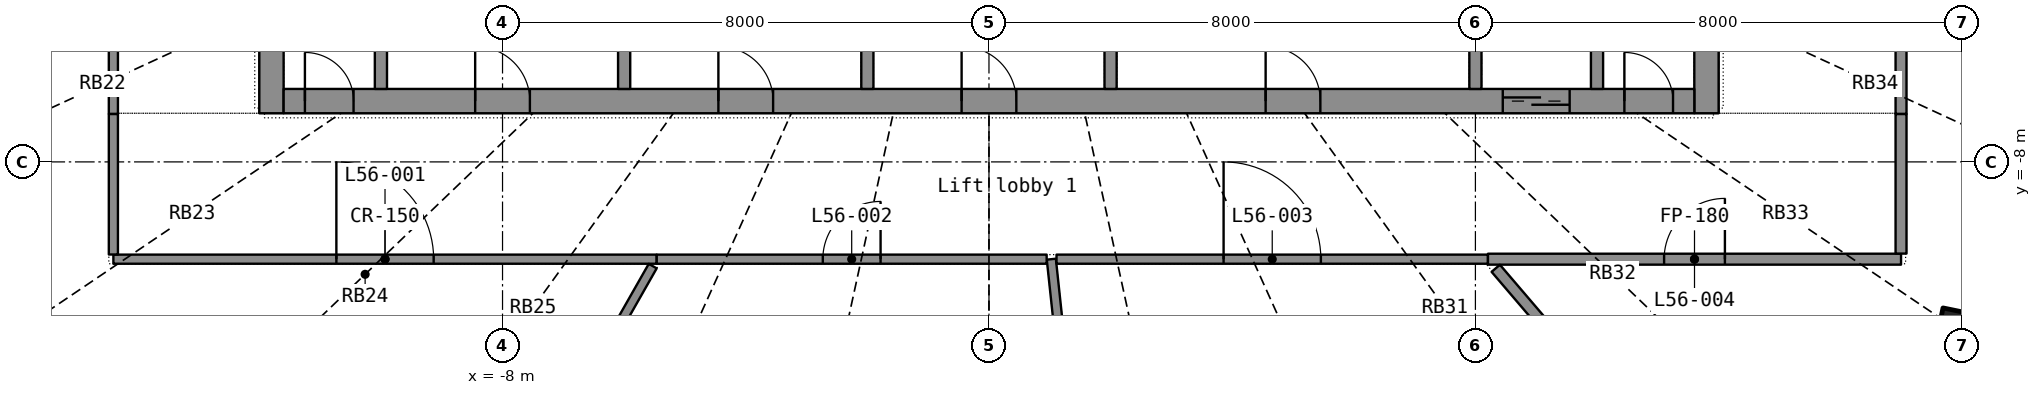
"""IFC4 building model, lengths in metres.
Left out: names, types, materials, properties, quantities, classifications, styles, units other than length and angle.
Written with IfcOpenShell. Run it as: python <this file> out.ifc"""

import sys

from ifc_helpers import new_model, si_unit, direction, frame, frame_2d, origin, origin_2d, place, context, subcontext, project, spatial, rectangle, hollow_rectangle, extrude, element, fill, save


model = new_model("IFC4")
c1 = context("Model", 3, precision=1e-05, world=origin(), true_north=direction((0.0, 1.0)))
c2 = subcontext(c1, "Body", "Model", "MODEL_VIEW")
j1 = project(units=[si_unit("LENGTHUNIT", "METRE"), si_unit("PLANEANGLEUNIT", "RADIAN")], contexts=[c1])
p1 = place(None, origin())
s1 = spatial("IfcSite", under=j1, at=p1, CompositionType="ELEMENT")
p2 = place(p1, origin())
s2 = spatial("IfcBuilding", under=s1, at=p2, CompositionType="ELEMENT")
p3 = place(p2, frame((0.0, 0.0, 231.9)))
s3 = spatial("IfcBuildingStorey", under=s2, at=p3, CompositionType="ELEMENT", Elevation=231.9)
p4 = place(p3, frame((15.923, -10.756, 0.0), z_axis=(-0.026510431, 0.018201192, 0.999482823), x_axis=(-0.720757976, -0.693156374, -0.006494692)))
e1 = element("IfcColumn", 1, at=p4, inside=s3, PredefinedType="COLUMN", context=c2, shape_type="SweptSolid", body=[
    extrude(hollow_rectangle(XDim=0.6, YDim=0.6, WallThickness=0.025, at=origin_2d()), origin(), (0.0, 0.0, 1.0), 3.702),
])
p5 = place(p3, frame((-11.8, -7.2, 0.0), z_axis=(0.0, 0.0, 1.0), x_axis=(0.0, 1.0, 0.0)))
e2 = element("IfcWall", 2, at=p5, inside=s3, PredefinedType="SHEAR", context=c2, shape_type="SweptSolid", body=[
    extrude(rectangle(XDim=14.4, YDim=0.4, at=frame_2d((7.2, 0.0))), origin(), (0.0, 0.0, 1.0), 3.3),
])
p6 = place(p5, frame((6.5, 0.0, 0.0)))
e3 = element("IfcOpeningElement", 3, at=p6, cuts=e2, PredefinedType="OPENING", context=c2, shape_type="SweptSolid", body=[
    extrude(rectangle(XDim=1.4, YDim=2.2, at=frame_2d((0.7, 1.1))), frame((0.0, 0.21, 0.0), z_axis=(0.0, -1.0, 0.0), x_axis=(1.0, 0.0, 0.0)), (0.0, 0.0, 1.0), 0.42),
])
p7 = place(p3, frame((11.8, -7.2, 0.0), z_axis=(0.0, 0.0, 1.0), x_axis=(0.0, 1.0, 0.0)))
e4 = element("IfcWall", 4, at=p7, inside=s3, PredefinedType="SHEAR", context=c2, shape_type="SweptSolid", body=[
    extrude(rectangle(XDim=14.4, YDim=0.4, at=frame_2d((7.2, 0.0))), origin(), (0.0, 0.0, 1.0), 3.3),
])
p8 = place(p7, frame((6.5, 0.0, 0.0)))
e5 = element("IfcOpeningElement", 5, at=p8, cuts=e4, PredefinedType="OPENING", context=c2, shape_type="SweptSolid", body=[
    extrude(rectangle(XDim=1.4, YDim=2.2, at=frame_2d((0.7, 1.1))), frame((0.0, 0.21, 0.0), z_axis=(0.0, -1.0, 0.0), x_axis=(1.0, 0.0, 0.0)), (0.0, 0.0, 1.0), 0.42),
])
p9 = place(p3, frame((-11.6, -7.0, 0.0), z_axis=(0.0, 0.0, 1.0), x_axis=(1.0, 0.0, 0.0)))
e6 = element("IfcWall", 6, at=p9, inside=s3, PredefinedType="SHEAR", context=c2, shape_type="SweptSolid", body=[
    extrude(rectangle(XDim=23.2, YDim=0.4, at=frame_2d((11.6, 0.0))), origin(), (0.0, 0.0, 1.0), 3.3),
])
p10 = place(p9, frame((20.05, 0.0, 0.0)))
e7 = element("IfcOpeningElement", 7, at=p10, cuts=e6, PredefinedType="OPENING", context=c2, shape_type="SweptSolid", body=[
    extrude(rectangle(XDim=1.1, YDim=2.2, at=frame_2d((0.55, 1.1))), frame((0.0, 0.21, 0.0), z_axis=(0.0, -1.0, 0.0), x_axis=(1.0, 0.0, 0.0)), (0.0, 0.0, 1.0), 0.42),
])
p11 = place(p9, frame((3.15, 0.0, 0.0)))
e8 = element("IfcOpeningElement", 8, at=p11, cuts=e6, PredefinedType="OPENING", context=c2, shape_type="SweptSolid", body=[
    extrude(rectangle(XDim=0.9, YDim=2.1, at=frame_2d((0.45, 1.05))), frame((0.0, 0.21, 0.0), z_axis=(0.0, -1.0, 0.0), x_axis=(1.0, 0.0, 0.0)), (0.0, 0.0, 1.0), 0.42),
])
p12 = place(p9, frame((7.15, 0.0, 0.0)))
e9 = element("IfcOpeningElement", 9, at=p12, cuts=e6, PredefinedType="OPENING", context=c2, shape_type="SweptSolid", body=[
    extrude(rectangle(XDim=0.9, YDim=2.1, at=frame_2d((0.45, 1.05))), frame((0.0, 0.21, 0.0), z_axis=(0.0, -1.0, 0.0), x_axis=(1.0, 0.0, 0.0)), (0.0, 0.0, 1.0), 0.42),
])
p13 = place(p9, frame((11.15, 0.0, 0.0)))
e10 = element("IfcOpeningElement", 10, at=p13, cuts=e6, PredefinedType="OPENING", context=c2, shape_type="SweptSolid", body=[
    extrude(rectangle(XDim=0.9, YDim=2.1, at=frame_2d((0.45, 1.05))), frame((0.0, 0.21, 0.0), z_axis=(0.0, -1.0, 0.0), x_axis=(1.0, 0.0, 0.0)), (0.0, 0.0, 1.0), 0.42),
])
p14 = place(p9, frame((16.15, 0.0, 0.0)))
e11 = element("IfcOpeningElement", 11, at=p14, cuts=e6, PredefinedType="OPENING", context=c2, shape_type="SweptSolid", body=[
    extrude(rectangle(XDim=0.9, YDim=2.1, at=frame_2d((0.45, 1.05))), frame((0.0, 0.21, 0.0), z_axis=(0.0, -1.0, 0.0), x_axis=(1.0, 0.0, 0.0)), (0.0, 0.0, 1.0), 0.42),
])
p15 = place(p9, frame((0.35, 0.0, 0.0)))
e12 = element("IfcOpeningElement", 12, at=p15, cuts=e6, PredefinedType="OPENING", context=c2, shape_type="SweptSolid", body=[
    extrude(rectangle(XDim=0.8, YDim=2.05, at=frame_2d((0.4, 1.025))), frame((0.0, 0.21, 0.0), z_axis=(0.0, -1.0, 0.0), x_axis=(1.0, 0.0, 0.0)), (0.0, 0.0, 1.0), 0.42),
])
p16 = place(p9, frame((22.05, 0.0, 0.0)))
e13 = element("IfcOpeningElement", 13, at=p16, cuts=e6, PredefinedType="OPENING", context=c2, shape_type="SweptSolid", body=[
    extrude(rectangle(XDim=0.8, YDim=2.05, at=frame_2d((0.4, 1.025))), frame((0.0, 0.21, 0.0), z_axis=(0.0, -1.0, 0.0), x_axis=(1.0, 0.0, 0.0)), (0.0, 0.0, 1.0), 0.42),
])
for number, where, z_axis, x_axis in (
    (14, (-10.0, -6.8, 0.0), (0.0, 0.0, 1.0), (0.0, 1.0, 0.0)),
    (15, (8.0, -6.8, 0.0), (0.0, 0.0, 1.0), (0.0, 1.0, 0.0)),
    (16, (10.0, -6.8, 0.0), (0.0, 0.0, 1.0), (0.0, 1.0, 0.0)),
):
    element("IfcWall", number, at=place(p3, frame(where, z_axis=z_axis, x_axis=x_axis)), inside=s3, PredefinedType="SHEAR", context=c2, shape_type="SweptSolid", body=[
        extrude(rectangle(XDim=2.9, YDim=0.2, at=frame_2d((1.45, 0.0))), origin(), (0.0, 0.0, 1.0), 3.3),
    ])
for number, where, z_axis, x_axis in (
    (17, (-6.0, -6.8, 0.0), (0.0, 0.0, 1.0), (0.0, 1.0, 0.0)),
    (18, (-2.0, -6.8, 0.0), (0.0, 0.0, 1.0), (0.0, 1.0, 0.0)),
    (19, (2.0, -6.8, 0.0), (0.0, 0.0, 1.0), (0.0, 1.0, 0.0)),
):
    element("IfcWall", number, at=place(p3, frame(where, z_axis=z_axis, x_axis=x_axis)), inside=s3, PredefinedType="PARTITIONING", context=c2, shape_type="SweptSolid", body=[
        extrude(rectangle(XDim=2.9, YDim=0.2, at=frame_2d((1.45, 0.0))), origin(), (0.0, 0.0, 1.0), 3.3),
    ])
p17 = place(p3, frame((-14.4, -9.6, 0.0), z_axis=(0.0, 0.0, 1.0), x_axis=(1.0, 0.0, 0.0)))
e20 = element("IfcWall", 20, at=p17, inside=s3, PredefinedType="PARTITIONING", context=c2, shape_type="SweptSolid", body=[
    extrude(rectangle(XDim=8.935, YDim=0.15, at=frame_2d((4.467, 0.0))), origin(), (0.0, 0.0, 1.0), 2.4),
])
p18 = place(p17, frame((3.667, 0.0, 0.0)))
e21 = element("IfcOpeningElement", 21, at=p18, cuts=e20, PredefinedType="OPENING", context=c2, shape_type="SweptSolid", body=[
    extrude(rectangle(XDim=1.6, YDim=2.4, at=frame_2d((0.8, 1.2))), frame((0.0, 0.085, 0.0), z_axis=(0.0, -1.0, 0.0), x_axis=(1.0, 0.0, 0.0)), (0.0, 0.0, 1.0), 0.17),
])
p19 = place(p3, frame((1.857, -17.385, 0.0), z_axis=(0.0, 0.0, 1.0), x_axis=(-0.106203924, 0.99434437, 0.0)))
e22 = element("IfcWall", 22, at=p19, inside=s3, PredefinedType="PARTITIONING", context=c2, shape_type="SweptSolid", body=[
    extrude(rectangle(XDim=7.83, YDim=0.15, at=frame_2d((3.915, 0.0))), origin(), (0.0, 0.0, 1.0), 2.4),
])
p20 = place(p3, frame((1.111, -9.6, 0.0), z_axis=(0.0, 0.0, 1.0), x_axis=(1.0, 0.0, 0.0)))
e23 = element("IfcWall", 23, at=p20, inside=s3, PredefinedType="PARTITIONING", context=c2, shape_type="SweptSolid", body=[
    extrude(rectangle(XDim=7.096, YDim=0.15, at=frame_2d((3.548, 0.0))), origin(), (0.0, 0.0, 1.0), 2.4),
])
p21 = place(p20, frame((2.748, 0.0, 0.0)))
e24 = element("IfcOpeningElement", 24, at=p21, cuts=e23, PredefinedType="OPENING", context=c2, shape_type="SweptSolid", body=[
    extrude(rectangle(XDim=1.6, YDim=2.4, at=frame_2d((0.8, 1.2))), frame((0.0, 0.085, 0.0), z_axis=(0.0, -1.0, 0.0), x_axis=(1.0, 0.0, 0.0)), (0.0, 0.0, 1.0), 0.17),
])
p22 = place(p3, frame((-9.006, -15.819, 0.0), z_axis=(0.0, 0.0, 1.0), x_axis=(0.494757339, 0.869031171, 0.0)))
e25 = element("IfcWall", 25, at=p22, inside=s3, PredefinedType="PARTITIONING", context=c2, shape_type="SweptSolid", body=[
    extrude(rectangle(XDim=7.025, YDim=0.15, at=frame_2d((3.513, 0.0))), origin(), (0.0, 0.0, 1.0), 2.4),
])
p23 = place(p3, frame((8.207, -9.6, 0.0), z_axis=(0.0, 0.0, 1.0), x_axis=(1.0, 0.0, 0.0)))
e26 = element("IfcWall", 26, at=p23, inside=s3, PredefinedType="PARTITIONING", context=c2, shape_type="SweptSolid", body=[
    extrude(rectangle(XDim=6.793, YDim=0.18, at=frame_2d((3.397, 0.0))), origin(), (0.0, 0.0, 1.0), 2.4),
])
p24 = place(p23, frame((2.897, 0.0, 0.0)))
e27 = element("IfcOpeningElement", 27, at=p24, cuts=e26, PredefinedType="OPENING", context=c2, shape_type="SweptSolid", body=[
    extrude(rectangle(XDim=1.0, YDim=2.1, at=frame_2d((0.5, 1.05))), frame((0.0, 0.1, 0.0), z_axis=(0.0, -1.0, 0.0), x_axis=(1.0, 0.0, 0.0)), (0.0, 0.0, 1.0), 0.2),
])
p25 = place(p3, frame((-5.464, -9.6, 0.0), z_axis=(0.0, 0.0, 1.0), x_axis=(1.0, 0.0, 0.0)))
e28 = element("IfcWall", 28, at=p25, inside=s3, PredefinedType="PARTITIONING", context=c2, shape_type="SweptSolid", body=[
    extrude(rectangle(XDim=6.413, YDim=0.15, at=frame_2d((3.207, 0.0))), origin(), (0.0, 0.0, 1.0), 2.4),
])
p26 = place(p25, frame((2.731, 0.0, 0.0)))
e29 = element("IfcOpeningElement", 29, at=p26, cuts=e28, PredefinedType="OPENING", context=c2, shape_type="SweptSolid", body=[
    extrude(rectangle(XDim=0.95, YDim=2.15, at=frame_2d((0.475, 1.075))), frame((0.0, 0.085, 0.0), z_axis=(0.0, -1.0, 0.0), x_axis=(1.0, 0.0, 0.0)), (0.0, 0.0, 1.0), 0.17),
])
p27 = place(p3, frame((12.226, -14.302, 0.0), z_axis=(0.0, 0.0, 1.0), x_axis=(-0.649766711, 0.760133686, 0.0)))
e30 = element("IfcWall", 30, at=p27, inside=s3, PredefinedType="PARTITIONING", context=c2, shape_type="SweptSolid", body=[
    extrude(rectangle(XDim=5.988, YDim=0.18, at=frame_2d((2.994, 0.0))), origin(), (0.0, 0.0, 1.0), 2.4),
])
p28 = place(p3, frame((15.0, -7.212, 0.0), z_axis=(0.0, 0.0, 1.0), x_axis=(0.0, 1.0, 0.0)))
e31 = element("IfcWall", 31, at=p28, inside=s3, PredefinedType="PARTITIONING", context=c2, shape_type="SweptSolid", body=[
    extrude(rectangle(XDim=5.712, YDim=0.18, at=frame_2d((2.856, 0.0))), origin(), (0.0, 0.0, 1.0), 2.4),
])
p29 = place(p3, frame((-14.4, -3.256, 0.0), z_axis=(0.0, 0.0, 1.0), x_axis=(0.0, -1.0, 0.0)))
e32 = element("IfcWall", 32, at=p29, inside=s3, PredefinedType="PARTITIONING", context=c2, shape_type="SweptSolid", body=[
    extrude(rectangle(XDim=3.956, YDim=0.15, at=frame_2d((1.978, 0.0))), origin(), (0.0, 0.0, 1.0), 2.4),
])
p30 = place(p3, frame((-14.4, -7.213, 0.0), z_axis=(0.0, 0.0, 1.0), x_axis=(0.0, -1.0, 0.0)))
e33 = element("IfcWall", 33, at=p30, inside=s3, PredefinedType="PARTITIONING", context=c2, shape_type="SweptSolid", body=[
    extrude(rectangle(XDim=2.31, YDim=0.15, at=frame_2d((1.155, 0.0))), origin(), (0.0, 0.0, 1.0), 2.4),
])
p31 = place(p3, frame((15.0, -9.508, 0.0), z_axis=(0.0, 0.0, 1.0), x_axis=(0.0, 1.0, 0.0)))
e34 = element("IfcWall", 34, at=p31, inside=s3, PredefinedType="PARTITIONING", context=c2, shape_type="SweptSolid", body=[
    extrude(rectangle(XDim=2.295, YDim=0.18, at=frame_2d((1.147, 0.0))), origin(), (0.0, 0.0, 1.0), 2.4),
])
p32 = place(p10, origin())
e35 = element("IfcDoor", 35, at=p32, inside=s3, OperationType="DOUBLE_DOOR_SLIDING", PredefinedType="DOOR", context=c2, shape_type="SweptSolid", body=[
    extrude(rectangle(XDim=1.1, YDim=2.2, at=frame_2d((0.55, 1.1))), frame((0.0, 0.025, 0.0), z_axis=(0.0, -1.0, 0.0), x_axis=(1.0, 0.0, 0.0)), (0.0, 0.0, 1.0), 0.05),
])
fill(e7, e35)
p33 = place(p11, origin())
e36 = element("IfcDoor", 36, at=p33, inside=s3, OperationType="SINGLE_SWING_LEFT", PredefinedType="DOOR", context=c2, shape_type="SweptSolid", body=[
    extrude(rectangle(XDim=0.9, YDim=2.1, at=frame_2d((0.45, 1.05))), frame((0.0, 0.025, 0.0), z_axis=(0.0, -1.0, 0.0), x_axis=(1.0, 0.0, 0.0)), (0.0, 0.0, 1.0), 0.05),
])
fill(e8, e36)
p34 = place(p12, origin())
e37 = element("IfcDoor", 37, at=p34, inside=s3, OperationType="SINGLE_SWING_LEFT", PredefinedType="DOOR", context=c2, shape_type="SweptSolid", body=[
    extrude(rectangle(XDim=0.9, YDim=2.1, at=frame_2d((0.45, 1.05))), frame((0.0, 0.025, 0.0), z_axis=(0.0, -1.0, 0.0), x_axis=(1.0, 0.0, 0.0)), (0.0, 0.0, 1.0), 0.05),
])
fill(e9, e37)
p35 = place(p13, origin())
e38 = element("IfcDoor", 38, at=p35, inside=s3, OperationType="SINGLE_SWING_LEFT", PredefinedType="DOOR", context=c2, shape_type="SweptSolid", body=[
    extrude(rectangle(XDim=0.9, YDim=2.1, at=frame_2d((0.45, 1.05))), frame((0.0, 0.025, 0.0), z_axis=(0.0, -1.0, 0.0), x_axis=(1.0, 0.0, 0.0)), (0.0, 0.0, 1.0), 0.05),
])
fill(e10, e38)
p36 = place(p14, origin())
e39 = element("IfcDoor", 39, at=p36, inside=s3, OperationType="SINGLE_SWING_LEFT", PredefinedType="DOOR", context=c2, shape_type="SweptSolid", body=[
    extrude(rectangle(XDim=0.9, YDim=2.1, at=frame_2d((0.45, 1.05))), frame((0.0, 0.025, 0.0), z_axis=(0.0, -1.0, 0.0), x_axis=(1.0, 0.0, 0.0)), (0.0, 0.0, 1.0), 0.05),
])
fill(e11, e39)
p37 = place(p15, origin())
e40 = element("IfcDoor", 40, at=p37, inside=s3, OperationType="SINGLE_SWING_LEFT", PredefinedType="DOOR", context=c2, shape_type="SweptSolid", body=[
    extrude(rectangle(XDim=0.8, YDim=2.05, at=frame_2d((0.4, 1.025))), frame((0.0, 0.025, 0.0), z_axis=(0.0, -1.0, 0.0), x_axis=(1.0, 0.0, 0.0)), (0.0, 0.0, 1.0), 0.05),
])
fill(e12, e40)
p38 = place(p16, origin())
e41 = element("IfcDoor", 41, at=p38, inside=s3, OperationType="SINGLE_SWING_LEFT", PredefinedType="DOOR", context=c2, shape_type="SweptSolid", body=[
    extrude(rectangle(XDim=0.8, YDim=2.05, at=frame_2d((0.4, 1.025))), frame((0.0, 0.025, 0.0), z_axis=(0.0, -1.0, 0.0), x_axis=(1.0, 0.0, 0.0)), (0.0, 0.0, 1.0), 0.05),
])
fill(e13, e41)
p39 = place(p18, origin())
e42 = element("IfcDoor", 42, at=p39, inside=s3, OperationType="DOUBLE_DOOR_SINGLE_SWING", PredefinedType="DOOR", context=c2, shape_type="SweptSolid", body=[
    extrude(rectangle(XDim=1.6, YDim=2.4, at=frame_2d((0.8, 1.2))), frame((0.0, 0.025, 0.0), z_axis=(0.0, -1.0, 0.0), x_axis=(1.0, 0.0, 0.0)), (0.0, 0.0, 1.0), 0.05),
])
fill(e21, e42)
p40 = place(p26, origin())
e43 = element("IfcDoor", 43, at=p40, inside=s3, OperationType="SINGLE_SWING_RIGHT", PredefinedType="DOOR", context=c2, shape_type="SweptSolid", body=[
    extrude(rectangle(XDim=0.95, YDim=2.15, at=frame_2d((0.475, 1.075))), frame((0.0, 0.025, 0.0), z_axis=(0.0, -1.0, 0.0), x_axis=(1.0, 0.0, 0.0)), (0.0, 0.0, 1.0), 0.05),
])
fill(e29, e43)
p41 = place(p21, origin())
e44 = element("IfcDoor", 44, at=p41, inside=s3, OperationType="DOUBLE_DOOR_SINGLE_SWING", PredefinedType="DOOR", context=c2, shape_type="SweptSolid", body=[
    extrude(rectangle(XDim=1.6, YDim=2.4, at=frame_2d((0.8, 1.2))), frame((0.0, 0.025, 0.0), z_axis=(0.0, -1.0, 0.0), x_axis=(1.0, 0.0, 0.0)), (0.0, 0.0, 1.0), 0.05),
])
fill(e24, e44)
p42 = place(p24, origin())
e45 = element("IfcDoor", 45, at=p42, inside=s3, OperationType="SINGLE_SWING_RIGHT", PredefinedType="DOOR", context=c2, shape_type="SweptSolid", body=[
    extrude(rectangle(XDim=1.0, YDim=2.1, at=frame_2d((0.5, 1.05))), frame((0.0, 0.025, 0.0), z_axis=(0.0, -1.0, 0.0), x_axis=(1.0, 0.0, 0.0)), (0.0, 0.0, 1.0), 0.05),
])
fill(e27, e45)
save(model, sys.argv[1])
